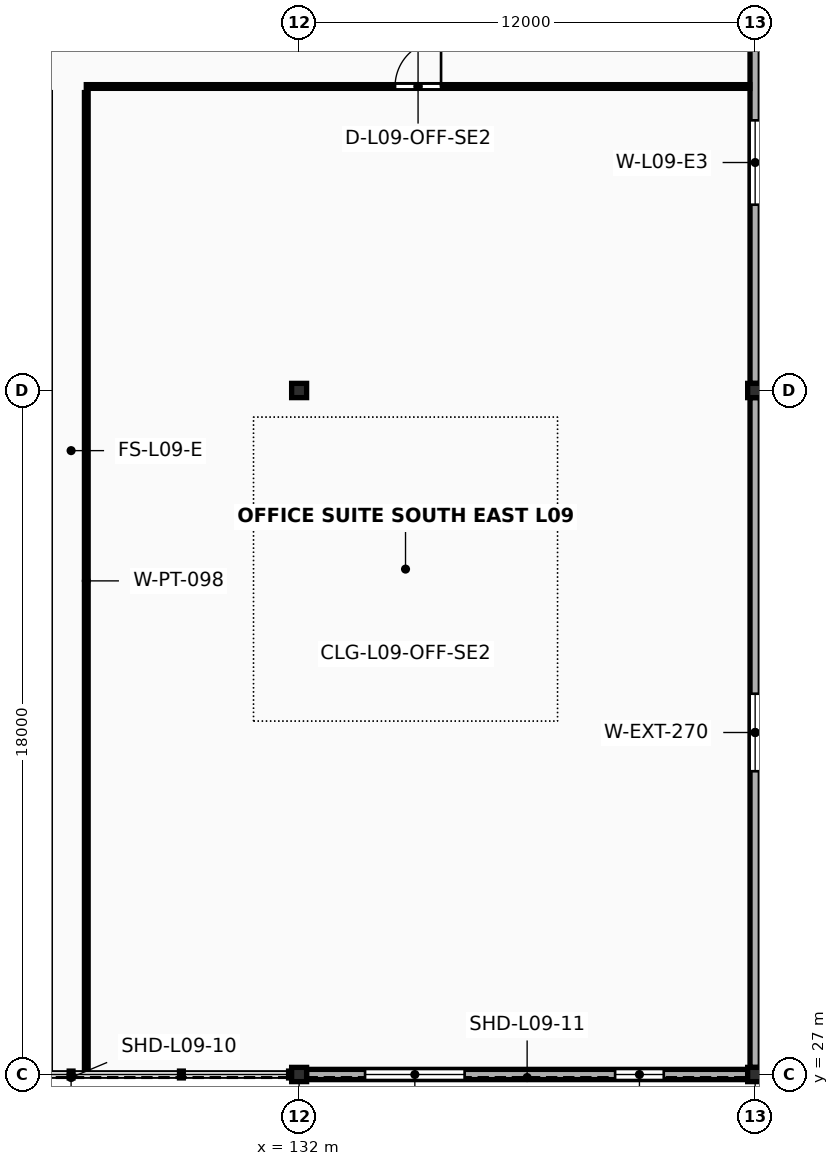
"""IFC4 building model, lengths in metres.
Left out: names, types, materials, properties, quantities, classifications, styles, units other than length and angle.
Written with IfcOpenShell. Run it as: python <this file> out.ifc"""

import sys

from ifc_helpers import new_model, si_unit, direction, frame, frame_2d, origin, origin_2d, place, context, subcontext, project, spatial, rectangle, i_section, extrude, element, fill, save


model = new_model("IFC4")
c1 = context("Model", 3, precision=1e-05, world=origin(), true_north=direction((0.0, 1.0)))
c2 = subcontext(c1, "Body", "Model", "MODEL_VIEW")
j1 = project(units=[si_unit("LENGTHUNIT", "METRE"), si_unit("PLANEANGLEUNIT", "RADIAN")], contexts=[c1])
p1 = place(None, origin())
s1 = spatial("IfcSite", under=j1, at=p1, CompositionType="ELEMENT")
p2 = place(p1, origin())
s2 = spatial("IfcBuilding", under=s1, at=p2, CompositionType="ELEMENT")
p3 = place(p2, frame((0.0, 0.0, 37.6)))
s3 = spatial("IfcBuildingStorey", under=s2, at=p3, CompositionType="ELEMENT", Elevation=37.6)
for number, where, z_axis, x_axis in (
    (1, (132.0, 27.0, 0.0), (0.0, 0.0, 1.0), (1.0, 0.0, 0.0)),
    (2, (132.0, 45.0, 0.0), (0.0, 0.0, 1.0), (1.0, 0.0, 0.0)),
    (3, (144.0, 27.0, 0.0), (0.0, 0.0, 1.0), (1.0, 0.0, 0.0)),
    (4, (144.0, 45.0, 0.0), (0.0, 0.0, 1.0), (1.0, 0.0, 0.0)),
):
    element("IfcColumn", number, at=place(p3, frame(where, z_axis=z_axis, x_axis=x_axis)), inside=s3, PredefinedType="COLUMN", context=c2, shape_type="SweptSolid", body=[
        extrude(i_section(OverallWidth=0.394, OverallDepth=0.375, WebThickness=0.017, FlangeThickness=0.028, FilletRadius=0.018, at=origin_2d()), origin(), (0.0, 0.0, 1.0), 4.0),
    ])
p4 = place(p3, frame((132.195, 27.0, 0.0), z_axis=(0.0, 0.0, 1.0), x_axis=(1.0, 0.0, 0.0)))
e5 = element("IfcWall", 5, at=p4, inside=s3, PredefinedType="SOLIDWALL", context=c2, shape_type="SweptSolid", body=[
    extrude(rectangle(XDim=11.61, YDim=0.27, at=frame_2d((5.805, 0.0))), origin(), (0.0, 0.0, 1.0), 3.291),
])
p5 = place(p4, frame((1.54, 0.0, 0.78)))
e6 = element("IfcOpeningElement", 6, at=p5, cuts=e5, PredefinedType="OPENING", context=c2, shape_type="SweptSolid", body=[
    extrude(rectangle(XDim=2.62, YDim=1.58, at=frame_2d((1.31, 0.79))), frame((0.0, 0.15, 0.0), z_axis=(0.0, -1.0, 0.0), x_axis=(1.0, 0.0, 0.0)), (0.0, 0.0, 1.0), 0.3),
])
p6 = place(p4, frame((8.12, 0.0, 0.78)))
e7 = element("IfcOpeningElement", 7, at=p6, cuts=e5, PredefinedType="OPENING", context=c2, shape_type="SweptSolid", body=[
    extrude(rectangle(XDim=1.28, YDim=1.74, at=frame_2d((0.64, 0.87))), frame((0.0, 0.15, 0.0), z_axis=(0.0, -1.0, 0.0), x_axis=(1.0, 0.0, 0.0)), (0.0, 0.0, 1.0), 0.3),
])
p7 = place(p3, frame((144.0, 27.186, 0.0), z_axis=(0.0, 0.0, 1.0), x_axis=(0.0, 1.0, 0.0)))
e8 = element("IfcWall", 8, at=p7, inside=s3, PredefinedType="SOLIDWALL", context=c2, shape_type="SweptSolid", body=[
    extrude(rectangle(XDim=17.629, YDim=0.27, at=frame_2d((8.814, 0.0))), origin(), (0.0, 0.0, 1.0), 3.291),
])
p8 = place(p7, frame((7.795, 0.0, 0.78)))
e9 = element("IfcOpeningElement", 9, at=p8, cuts=e8, PredefinedType="OPENING", context=c2, shape_type="SweptSolid", body=[
    extrude(rectangle(XDim=2.04, YDim=1.74, at=frame_2d((1.02, 0.87))), frame((0.0, 0.15, 0.0), z_axis=(0.0, -1.0, 0.0), x_axis=(1.0, 0.0, 0.0)), (0.0, 0.0, 1.0), 0.3),
])
p9 = place(p3, frame((144.0, 45.186, 0.0), z_axis=(0.0, 0.0, 1.0), x_axis=(0.0, 1.0, 0.0)))
e10 = element("IfcWall", 10, at=p9, inside=s3, PredefinedType="SOLIDWALL", context=c2, shape_type="SweptSolid", body=[
    extrude(rectangle(XDim=11.629, YDim=0.27, at=frame_2d((5.814, 0.0))), origin(), (0.0, 0.0, 1.0), 3.291),
])
p10 = place(p9, frame((4.704, 0.0, 0.78)))
e11 = element("IfcOpeningElement", 11, at=p10, cuts=e10, PredefinedType="OPENING", context=c2, shape_type="SweptSolid", body=[
    extrude(rectangle(XDim=2.22, YDim=1.74, at=frame_2d((1.11, 0.87))), frame((0.0, 0.15, 0.0), z_axis=(0.0, -1.0, 0.0), x_axis=(1.0, 0.0, 0.0)), (0.0, 0.0, 1.0), 0.3),
])
p11 = place(p3, frame((126.4, 53.0, 0.0), z_axis=(0.0, 0.0, 1.0), x_axis=(1.0, 0.0, 0.0)))
e12 = element("IfcWall", 12, at=p11, inside=s3, PredefinedType="PARTITIONING", context=c2, shape_type="SweptSolid", body=[
    extrude(rectangle(XDim=17.46, YDim=0.098, at=frame_2d((8.73, 0.0))), origin(), (0.0, 0.0, 1.0), 2.88),
])
p12 = place(p11, frame((8.125, 0.0, 0.0)))
e13 = element("IfcOpeningElement", 13, at=p12, cuts=e12, PredefinedType="OPENING", context=c2, shape_type="SweptSolid", body=[
    extrude(rectangle(XDim=1.21, YDim=2.25, at=frame_2d((0.605, 1.125))), frame((0.0, 0.064, 0.0), z_axis=(0.0, -1.0, 0.0), x_axis=(1.0, 0.0, 0.0)), (0.0, 0.0, 1.0), 0.128),
])
p13 = place(p3, frame((126.4, 27.14, 0.0), z_axis=(0.0, 0.0, 1.0), x_axis=(0.0, 1.0, 0.0)))
e14 = element("IfcWall", 14, at=p13, inside=s3, PredefinedType="PARTITIONING", context=c2, shape_type="SweptSolid", body=[
    extrude(rectangle(XDim=25.7, YDim=0.098, at=frame_2d((12.85, 0.0))), origin(), (0.0, 0.0, 1.0), 2.88),
])
p14 = place(p5, origin())
e15 = element("IfcWindow", 15, at=p14, inside=s3, PartitioningType="DOUBLE_PANEL_VERTICAL", PredefinedType="WINDOW", context=c2, shape_type="SweptSolid", body=[
    extrude(rectangle(XDim=2.62, YDim=1.58, at=frame_2d((1.31, 0.79))), frame((0.0, 0.03, 0.0), z_axis=(0.0, -1.0, 0.0), x_axis=(1.0, 0.0, 0.0)), (0.0, 0.0, 1.0), 0.06),
])
fill(e6, e15)
p15 = place(p6, origin())
e16 = element("IfcWindow", 16, at=p15, inside=s3, PartitioningType="SINGLE_PANEL", PredefinedType="WINDOW", context=c2, shape_type="SweptSolid", body=[
    extrude(rectangle(XDim=1.28, YDim=1.74, at=frame_2d((0.64, 0.87))), frame((0.0, 0.03, 0.0), z_axis=(0.0, -1.0, 0.0), x_axis=(1.0, 0.0, 0.0)), (0.0, 0.0, 1.0), 0.06),
])
fill(e7, e16)
p16 = place(p8, origin())
e17 = element("IfcWindow", 17, at=p16, inside=s3, PartitioningType="DOUBLE_PANEL_VERTICAL", PredefinedType="WINDOW", context=c2, shape_type="SweptSolid", body=[
    extrude(rectangle(XDim=2.04, YDim=1.74, at=frame_2d((1.02, 0.87))), frame((0.0, 0.03, 0.0), z_axis=(0.0, -1.0, 0.0), x_axis=(1.0, 0.0, 0.0)), (0.0, 0.0, 1.0), 0.06),
])
fill(e9, e17)
p17 = place(p10, origin())
e18 = element("IfcWindow", 18, at=p17, inside=s3, PartitioningType="DOUBLE_PANEL_VERTICAL", PredefinedType="WINDOW", context=c2, shape_type="SweptSolid", body=[
    extrude(rectangle(XDim=2.22, YDim=1.74, at=frame_2d((1.11, 0.87))), frame((0.0, 0.03, 0.0), z_axis=(0.0, -1.0, 0.0), x_axis=(1.0, 0.0, 0.0)), (0.0, 0.0, 1.0), 0.06),
])
fill(e11, e18)
p18 = place(p12, origin())
e19 = element("IfcDoor", 19, at=p18, inside=s3, OperationType="SINGLE_SWING_RIGHT", PredefinedType="DOOR", context=c2, shape_type="SweptSolid", body=[
    extrude(rectangle(XDim=1.21, YDim=2.25, at=frame_2d((0.605, 1.125))), frame((0.0, 0.025, 0.0), z_axis=(0.0, -1.0, 0.0), x_axis=(1.0, 0.0, 0.0)), (0.0, 0.0, 1.0), 0.05),
])
fill(e13, e19)
save(model, sys.argv[1])
